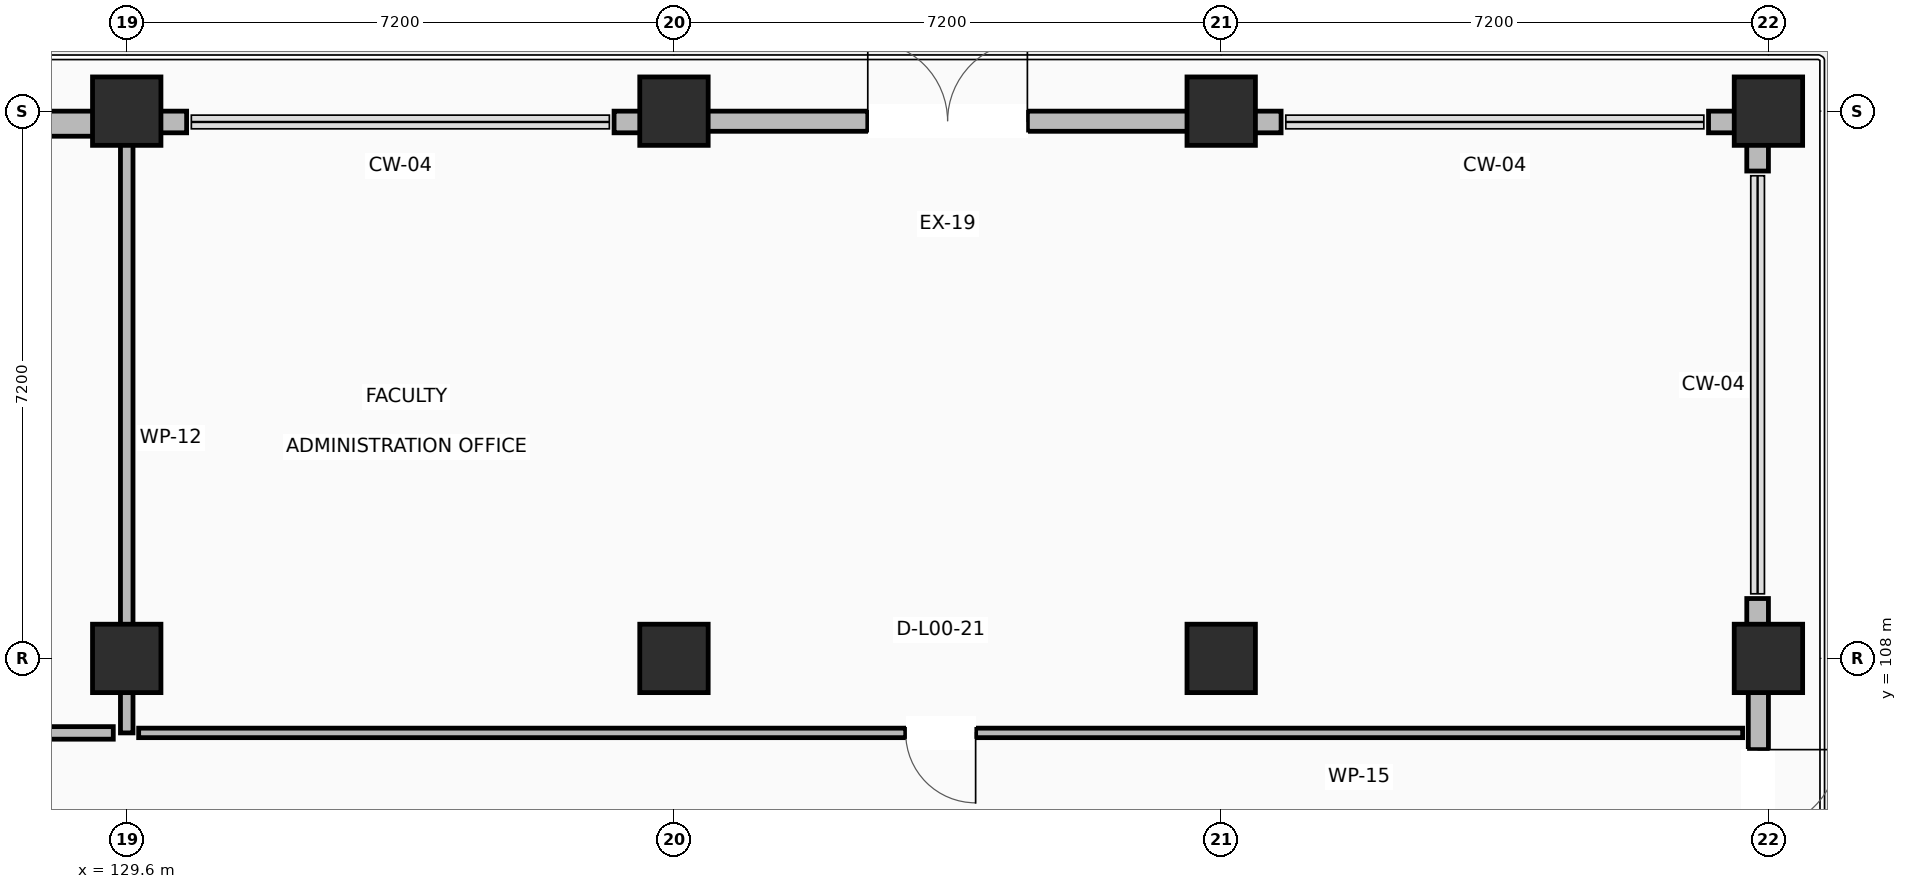
"""IFC4 building model, lengths in metres.
Left out: names, types, materials, properties, quantities, classifications, styles, units other than length and angle.
Written with IfcOpenShell. Run it as: python <this file> out.ifc"""

import sys

from ifc_helpers import new_model, si_unit, direction, frame, frame_2d, origin, origin_2d, place, context, subcontext, project, spatial, rectangle, extrude, element, fill, save


model = new_model("IFC4")
c1 = context("Model", 3, precision=1e-05, world=origin(), true_north=direction((0.0, 1.0)))
c2 = subcontext(c1, "Body", "Model", "MODEL_VIEW")
j1 = project(units=[si_unit("LENGTHUNIT", "METRE"), si_unit("PLANEANGLEUNIT", "RADIAN")], contexts=[c1])
p1 = place(None, origin())
s1 = spatial("IfcSite", under=j1, at=p1, CompositionType="ELEMENT")
p2 = place(p1, origin())
s2 = spatial("IfcBuilding", under=s1, at=p2, CompositionType="ELEMENT")
p3 = place(p2, origin())
s3 = spatial("IfcBuildingStorey", under=s2, at=p3, CompositionType="ELEMENT", Elevation=0.0)
for number, where, z_axis, x_axis in (
    (1, (129.6, 108.0, 0.0), (0.0, 0.0, 1.0), (1.0, 0.0, 0.0)),
    (2, (129.6, 115.2, 0.0), (0.0, 0.0, 1.0), (1.0, 0.0, 0.0)),
    (3, (136.8, 108.0, 0.0), (0.0, 0.0, 1.0), (1.0, 0.0, 0.0)),
    (4, (136.8, 115.2, 0.0), (0.0, 0.0, 1.0), (1.0, 0.0, 0.0)),
    (5, (144.0, 108.0, 0.0), (0.0, 0.0, 1.0), (1.0, 0.0, 0.0)),
    (6, (144.0, 115.2, 0.0), (0.0, 0.0, 1.0), (1.0, 0.0, 0.0)),
    (7, (151.2, 108.0, 0.0), (0.0, 0.0, 1.0), (1.0, 0.0, 0.0)),
    (8, (151.2, 115.2, 0.0), (0.0, 0.0, 1.0), (1.0, 0.0, 0.0)),
):
    element("IfcColumn", number, at=place(p3, frame(where, z_axis=z_axis, x_axis=x_axis)), inside=s3, PredefinedType="COLUMN", context=c2, shape_type="SweptSolid", body=[
        extrude(rectangle(XDim=0.9, YDim=0.9, at=origin_2d()), origin(), (0.0, 0.0, 1.0), 4.22),
    ])
p4 = place(p3, frame((151.067, 108.0, 0.0), z_axis=(0.0, 0.0, 1.0), x_axis=(0.0, -1.0, 0.0)))
e9 = element("IfcWall", 9, at=p4, inside=s3, PredefinedType="STANDARD", context=c2, shape_type="SweptSolid", body=[
    extrude(rectangle(XDim=7.2, YDim=0.265, at=frame_2d((3.6, 0.0))), origin(), (0.0, 0.0, 1.0), 2.6),
])
p5 = place(p4, frame((1.2, 0.0, 0.0)))
e10 = element("IfcOpeningElement", 10, at=p5, cuts=e9, PredefinedType="OPENING", context=c2, shape_type="SweptSolid", body=[
    extrude(rectangle(XDim=2.1, YDim=2.3, at=frame_2d((1.05, 1.15))), frame((0.0, 0.142, 0.0), z_axis=(0.0, -1.0, 0.0), x_axis=(1.0, 0.0, 0.0)), (0.0, 0.0, 1.0), 0.285),
])
p6 = place(p3, frame((151.058, 108.0, 0.0), z_axis=(0.0, 0.0, 1.0), x_axis=(0.0, 1.0, 0.0)))
e11 = element("IfcWall", 11, at=p6, inside=s3, PredefinedType="STANDARD", context=c2, shape_type="SweptSolid", body=[
    extrude(rectangle(XDim=0.788, YDim=0.285, at=frame_2d((0.394, 0.0))), origin(), (0.0, 0.0, 1.0), 2.6),
])
p7 = place(p3, frame((151.058, 114.412, 0.0), z_axis=(0.0, 0.0, 1.0), x_axis=(0.0, 1.0, 0.0)))
e12 = element("IfcWall", 12, at=p7, inside=s3, PredefinedType="STANDARD", context=c2, shape_type="SweptSolid", body=[
    extrude(rectangle(XDim=0.503, YDim=0.285, at=frame_2d((0.251, 0.0))), origin(), (0.0, 0.0, 1.0), 2.6),
])
p8 = place(p3, frame((136.8, 115.067, 0.0), z_axis=(0.0, 0.0, 1.0), x_axis=(1.0, 0.0, 0.0)))
e13 = element("IfcWall", 13, at=p8, inside=s3, PredefinedType="STANDARD", context=c2, shape_type="SweptSolid", body=[
    extrude(rectangle(XDim=7.2, YDim=0.265, at=frame_2d((3.6, 0.0))), origin(), (0.0, 0.0, 1.0), 2.6),
])
p9 = place(p8, frame((2.55, 0.0, 0.0)))
e14 = element("IfcOpeningElement", 14, at=p9, cuts=e13, PredefinedType="OPENING", context=c2, shape_type="SweptSolid", body=[
    extrude(rectangle(XDim=2.1, YDim=2.3, at=frame_2d((1.05, 1.15))), frame((0.0, 0.142, 0.0), z_axis=(0.0, -1.0, 0.0), x_axis=(1.0, 0.0, 0.0)), (0.0, 0.0, 1.0), 0.285),
])
p10 = place(p3, frame((122.4, 115.035, 0.0), z_axis=(0.0, 0.0, 1.0), x_axis=(1.0, 0.0, 0.0)))
e15 = element("IfcWall", 15, at=p10, inside=s3, PredefinedType="STANDARD", context=c2, shape_type="SweptSolid", body=[
    extrude(rectangle(XDim=7.2, YDim=0.33, at=frame_2d((3.6, 0.0))), origin(), (0.0, 0.0, 1.0), 2.6),
])
p11 = place(p10, frame((2.55, 0.0, 0.0)))
e16 = element("IfcOpeningElement", 16, at=p11, cuts=e15, PredefinedType="OPENING", context=c2, shape_type="SweptSolid", body=[
    extrude(rectangle(XDim=2.1, YDim=2.3, at=frame_2d((1.05, 1.15))), frame((0.0, 0.175, 0.0), z_axis=(0.0, -1.0, 0.0), x_axis=(1.0, 0.0, 0.0)), (0.0, 0.0, 1.0), 0.35),
])
p12 = place(p3, frame((151.2, 115.058, 0.0), z_axis=(0.0, 0.0, 1.0), x_axis=(-1.0, 0.0, 0.0)))
e17 = element("IfcWall", 17, at=p12, inside=s3, PredefinedType="STANDARD", context=c2, shape_type="SweptSolid", body=[
    extrude(rectangle(XDim=0.788, YDim=0.285, at=frame_2d((0.394, 0.0))), origin(), (0.0, 0.0, 1.0), 2.6),
])
for number, where, z_axis, x_axis in (
    (18, (144.788, 115.058, 0.0), (0.0, 0.0, 1.0), (-1.0, 0.0, 0.0)),
    (19, (136.8, 115.058, 0.0), (0.0, 0.0, 1.0), (-1.0, 0.0, 0.0)),
):
    element("IfcWall", number, at=place(p3, frame(where, z_axis=z_axis, x_axis=x_axis)), inside=s3, PredefinedType="STANDARD", context=c2, shape_type="SweptSolid", body=[
        extrude(rectangle(XDim=0.788, YDim=0.285, at=frame_2d((0.394, 0.0))), origin(), (0.0, 0.0, 1.0), 2.6),
    ])
p13 = place(p3, frame((130.388, 115.058, 0.0), z_axis=(0.0, 0.0, 1.0), x_axis=(-1.0, 0.0, 0.0)))
e20 = element("IfcWall", 20, at=p13, inside=s3, PredefinedType="STANDARD", context=c2, shape_type="SweptSolid", body=[
    extrude(rectangle(XDim=0.788, YDim=0.285, at=frame_2d((0.394, 0.0))), origin(), (0.0, 0.0, 1.0), 2.6),
])
p14 = place(p3, frame((129.6, 114.775, 0.0), z_axis=(0.0, 0.0, 1.0), x_axis=(0.0, -1.0, 0.0)))
e21 = element("IfcWall", 21, at=p14, inside=s3, PredefinedType="PARTITIONING", context=c2, shape_type="SweptSolid", body=[
    extrude(rectangle(XDim=7.755, YDim=0.165, at=frame_2d((3.877, 0.0))), origin(), (0.0, 0.0, 1.0), 2.6),
])
p15 = place(p3, frame((129.423, 107.02, 0.0), z_axis=(0.0, 0.0, 1.0), x_axis=(-1.0, 0.0, 0.0)))
e22 = element("IfcWall", 22, at=p15, inside=s3, PredefinedType="PARTITIONING", context=c2, shape_type="SweptSolid", body=[
    extrude(rectangle(XDim=21.255, YDim=0.165, at=frame_2d((10.627, 0.0))), origin(), (0.0, 0.0, 1.0), 2.6),
])
p16 = place(p15, frame((10.087, 0.0, 0.0)))
e23 = element("IfcOpeningElement", 23, at=p16, cuts=e22, PredefinedType="OPENING", context=c2, shape_type="SweptSolid", body=[
    extrude(rectangle(XDim=1.08, YDim=2.15, at=frame_2d((0.54, 1.075))), frame((0.0, 0.093, 0.0), z_axis=(0.0, -1.0, 0.0), x_axis=(1.0, 0.0, 0.0)), (0.0, 0.0, 1.0), 0.185),
])
p17 = place(p3, frame((150.861, 107.02, 0.0), z_axis=(0.0, 0.0, 1.0), x_axis=(-1.0, 0.0, 0.0)))
e24 = element("IfcWall", 24, at=p17, inside=s3, PredefinedType="PARTITIONING", context=c2, shape_type="SweptSolid", body=[
    extrude(rectangle(XDim=21.104, YDim=0.125, at=frame_2d((10.552, 0.0))), origin(), (0.0, 0.0, 1.0), 2.6),
])
p18 = place(p17, frame((10.092, 0.0, 0.0)))
e25 = element("IfcOpeningElement", 25, at=p18, cuts=e24, PredefinedType="OPENING", context=c2, shape_type="SweptSolid", body=[
    extrude(rectangle(XDim=0.92, YDim=2.1, at=frame_2d((0.46, 1.05))), frame((0.0, 0.073, 0.0), z_axis=(0.0, -1.0, 0.0), x_axis=(1.0, 0.0, 0.0)), (0.0, 0.0, 1.0), 0.145),
])
p19 = place(p5, origin())
e26 = element("IfcDoor", 26, at=p19, inside=s3, OperationType="DOUBLE_DOOR_SINGLE_SWING", PredefinedType="DOOR", context=c2, shape_type="SweptSolid", body=[
    extrude(rectangle(XDim=2.1, YDim=2.3, at=frame_2d((1.05, 1.15))), frame((0.0, 0.025, 0.0), z_axis=(0.0, -1.0, 0.0), x_axis=(1.0, 0.0, 0.0)), (0.0, 0.0, 1.0), 0.05),
])
fill(e10, e26)
p20 = place(p9, origin())
e27 = element("IfcDoor", 27, at=p20, inside=s3, OperationType="DOUBLE_DOOR_SINGLE_SWING", PredefinedType="DOOR", context=c2, shape_type="SweptSolid", body=[
    extrude(rectangle(XDim=2.1, YDim=2.3, at=frame_2d((1.05, 1.15))), frame((0.0, 0.025, 0.0), z_axis=(0.0, -1.0, 0.0), x_axis=(1.0, 0.0, 0.0)), (0.0, 0.0, 1.0), 0.05),
])
fill(e14, e27)
p21 = place(p18, origin())
e28 = element("IfcDoor", 28, at=p21, inside=s3, OperationType="SINGLE_SWING_LEFT", PredefinedType="DOOR", context=c2, shape_type="SweptSolid", body=[
    extrude(rectangle(XDim=0.92, YDim=2.1, at=frame_2d((0.46, 1.05))), frame((0.0, 0.025, 0.0), z_axis=(0.0, -1.0, 0.0), x_axis=(1.0, 0.0, 0.0)), (0.0, 0.0, 1.0), 0.05),
])
fill(e25, e28)
save(model, sys.argv[1])
